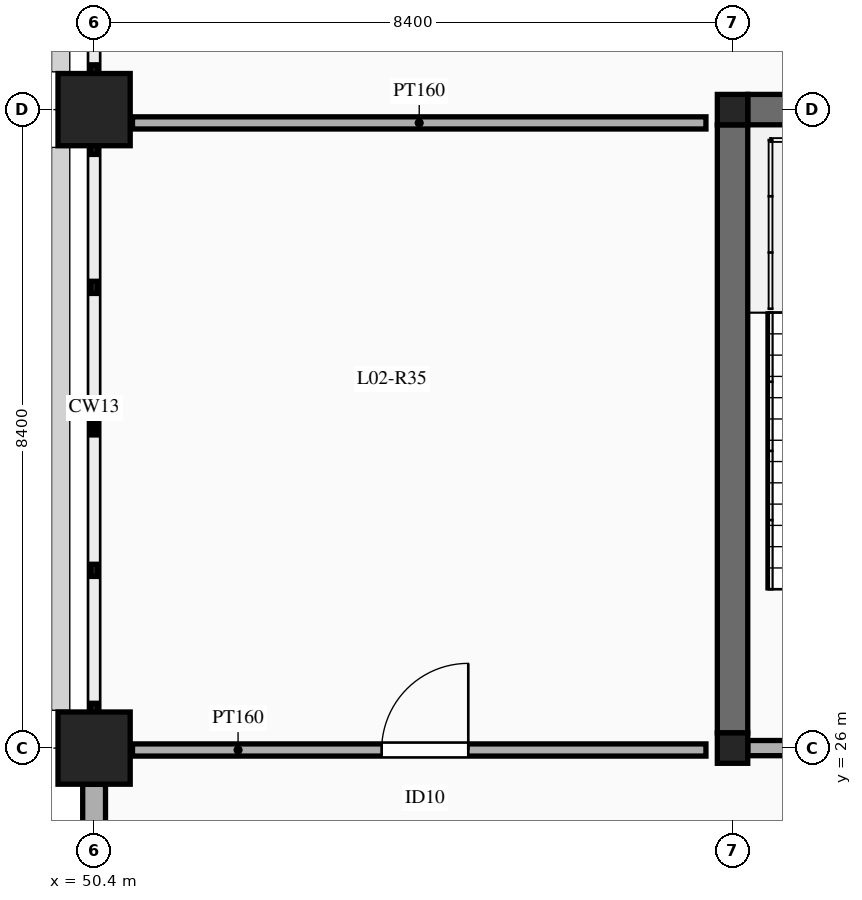
"""IFC4 building model, lengths in metres.
Left out: names, types, materials, properties, quantities, classifications, styles, units other than length and angle.
Written with IfcOpenShell. Run it as: python <this file> out.ifc"""

import sys

from ifc_helpers import new_model, si_unit, direction, frame, frame_2d, origin, origin_2d, place, context, subcontext, project, spatial, rectangle, extrude, element, fill, save


model = new_model("IFC4")
c1 = context("Model", 3, precision=1e-05, world=origin(), true_north=direction((0.0, 1.0)))
c2 = subcontext(c1, "Body", "Model", "MODEL_VIEW")
j1 = project(units=[si_unit("LENGTHUNIT", "METRE"), si_unit("PLANEANGLEUNIT", "RADIAN")], contexts=[c1])
p1 = place(None, origin())
s1 = spatial("IfcSite", under=j1, at=p1, CompositionType="ELEMENT")
p2 = place(p1, origin())
s2 = spatial("IfcBuilding", under=s1, at=p2, CompositionType="ELEMENT")
p3 = place(p2, frame((0.0, 0.0, 10.2)))
s3 = spatial("IfcBuildingStorey", under=s2, at=p3, CompositionType="ELEMENT", Elevation=10.2)
for number, where, z_axis, x_axis in (
    (1, (50.4, 26.0, 0.0), (0.0, 0.0, 1.0), (1.0, 0.0, 0.0)),
    (2, (50.4, 34.4, 0.0), (0.0, 0.0, 1.0), (1.0, 0.0, 0.0)),
):
    element("IfcColumn", number, at=place(p3, frame(where, z_axis=z_axis, x_axis=x_axis)), inside=s3, PredefinedType="COLUMN", context=c2, shape_type="SweptSolid", body=[
        extrude(rectangle(XDim=0.95, YDim=0.95, at=origin_2d()), origin(), (0.0, 0.0, 1.0), 4.8),
    ])
for number, where, z_axis, x_axis in (
    (3, (58.8, 26.0, 0.0), (0.0, 0.0, 1.0), (1.0, 0.0, 0.0)),
    (4, (58.8, 34.4, 0.0), (0.0, 0.0, 1.0), (1.0, 0.0, 0.0)),
):
    element("IfcColumn", number, at=place(p3, frame(where, z_axis=z_axis, x_axis=x_axis)), inside=s3, PredefinedType="COLUMN", context=c2, shape_type="SweptSolid", body=[
        extrude(rectangle(XDim=0.4, YDim=0.4, at=origin_2d()), origin(), (0.0, 0.0, 1.0), 4.8),
    ])
for number, where, z_axis, x_axis in (
    (5, (58.8, 26.2, 0.0), (0.0, 0.0, 1.0), (0.0, 1.0, 0.0)),
    (6, (59.0, 34.4, 0.0), (0.0, 0.0, 1.0), (1.0, 0.0, 0.0)),
):
    element("IfcWall", number, at=place(p3, frame(where, z_axis=z_axis, x_axis=x_axis)), inside=s3, PredefinedType="SHEAR", context=c2, shape_type="SweptSolid", body=[
        extrude(rectangle(XDim=8.0, YDim=0.4, at=frame_2d((4.0, 0.0))), origin(), (0.0, 0.0, 1.0), 4.8),
    ])
p4 = place(p3, frame((50.4, 18.077, 0.0), z_axis=(0.0, 0.0, 1.0), x_axis=(0.0, 1.0, 0.0)))
e7 = element("IfcWall", 7, at=p4, inside=s3, PredefinedType="SOLIDWALL", context=c2, shape_type="SweptSolid", body=[
    extrude(rectangle(XDim=7.446, YDim=0.3, at=frame_2d((3.723, 0.0))), origin(), (0.0, 0.0, 1.0), 3.85),
])
p5 = place(p4, frame((1.062, 0.0, 0.9)))
e8 = element("IfcOpeningElement", 8, at=p5, cuts=e7, PredefinedType="OPENING", context=c2, shape_type="SweptSolid", body=[
    extrude(rectangle(XDim=1.6, YDim=2.1, at=frame_2d((0.8, 1.05))), frame((0.0, 0.16, 0.0), z_axis=(0.0, -1.0, 0.0), x_axis=(1.0, 0.0, 0.0)), (0.0, 0.0, 1.0), 0.32),
])
p6 = place(p4, frame((4.784, 0.0, 0.9)))
e9 = element("IfcOpeningElement", 9, at=p6, cuts=e7, PredefinedType="OPENING", context=c2, shape_type="SweptSolid", body=[
    extrude(rectangle(XDim=1.6, YDim=2.1, at=frame_2d((0.8, 1.05))), frame((0.0, 0.16, 0.0), z_axis=(0.0, -1.0, 0.0), x_axis=(1.0, 0.0, 0.0)), (0.0, 0.0, 1.0), 0.32),
])
p7 = place(p3, frame((59.0, 26.0, 0.0), z_axis=(0.0, 0.0, 1.0), x_axis=(1.0, 0.0, 0.0)))
e10 = element("IfcWall", 10, at=p7, inside=s3, PredefinedType="SOLIDWALL", context=c2, shape_type="SweptSolid", body=[
    extrude(rectangle(XDim=8.0, YDim=0.2, at=frame_2d((4.0, 0.0))), origin(), (0.0, 0.0, 1.0), 3.93),
])
p8 = place(p7, frame((1.55, 0.0, 0.0)))
e11 = element("IfcOpeningElement", 11, at=p8, cuts=e10, PredefinedType="OPENING", context=c2, shape_type="SweptSolid", body=[
    extrude(rectangle(XDim=1.15, YDim=2.15, at=frame_2d((0.575, 1.075))), frame((0.0, 0.11, 0.0), z_axis=(0.0, -1.0, 0.0), x_axis=(1.0, 0.0, 0.0)), (0.0, 0.0, 1.0), 0.22),
])
p9 = place(p7, frame((5.35, 0.0, 0.0)))
e12 = element("IfcOpeningElement", 12, at=p9, cuts=e10, PredefinedType="OPENING", context=c2, shape_type="SweptSolid", body=[
    extrude(rectangle(XDim=1.22, YDim=2.15, at=frame_2d((0.61, 1.075))), frame((0.0, 0.11, 0.0), z_axis=(0.0, -1.0, 0.0), x_axis=(1.0, 0.0, 0.0)), (0.0, 0.0, 1.0), 0.22),
])
p10 = place(p3, frame((50.905, 25.975, 0.0), z_axis=(0.0, 0.0, 1.0), x_axis=(1.0, 0.0, 0.0)))
e13 = element("IfcWall", 13, at=p10, inside=s3, PredefinedType="PARTITIONING", context=c2, shape_type="SweptSolid", body=[
    extrude(rectangle(XDim=7.545, YDim=0.16, at=frame_2d((3.772, 0.0))), origin(), (0.0, 0.0, 1.0), 3.75),
])
p11 = place(p10, frame((3.278, 0.0, 0.0)))
e14 = element("IfcOpeningElement", 14, at=p11, cuts=e13, PredefinedType="OPENING", context=c2, shape_type="SweptSolid", body=[
    extrude(rectangle(XDim=1.14, YDim=2.22, at=frame_2d((0.57, 1.11))), frame((0.0, 0.09, 0.0), z_axis=(0.0, -1.0, 0.0), x_axis=(1.0, 0.0, 0.0)), (0.0, 0.0, 1.0), 0.18),
])
p12 = place(p3, frame((50.905, 34.225, 0.0), z_axis=(0.0, 0.0, 1.0), x_axis=(1.0, 0.0, 0.0)))
e15 = element("IfcWall", 15, at=p12, inside=s3, PredefinedType="PARTITIONING", context=c2, shape_type="SweptSolid", body=[
    extrude(rectangle(XDim=7.545, YDim=0.16, at=frame_2d((3.772, 0.0))), origin(), (0.0, 0.0, 1.0), 3.75),
])
p13 = place(p11, origin())
e16 = element("IfcDoor", 16, at=p13, inside=s3, OperationType="SINGLE_SWING_RIGHT", PredefinedType="DOOR", context=c2, shape_type="SweptSolid", body=[
    extrude(rectangle(XDim=1.14, YDim=2.22, at=frame_2d((0.57, 1.11))), frame((0.0, 0.025, 0.0), z_axis=(0.0, -1.0, 0.0), x_axis=(1.0, 0.0, 0.0)), (0.0, 0.0, 1.0), 0.05),
])
fill(e14, e16)
save(model, sys.argv[1])
